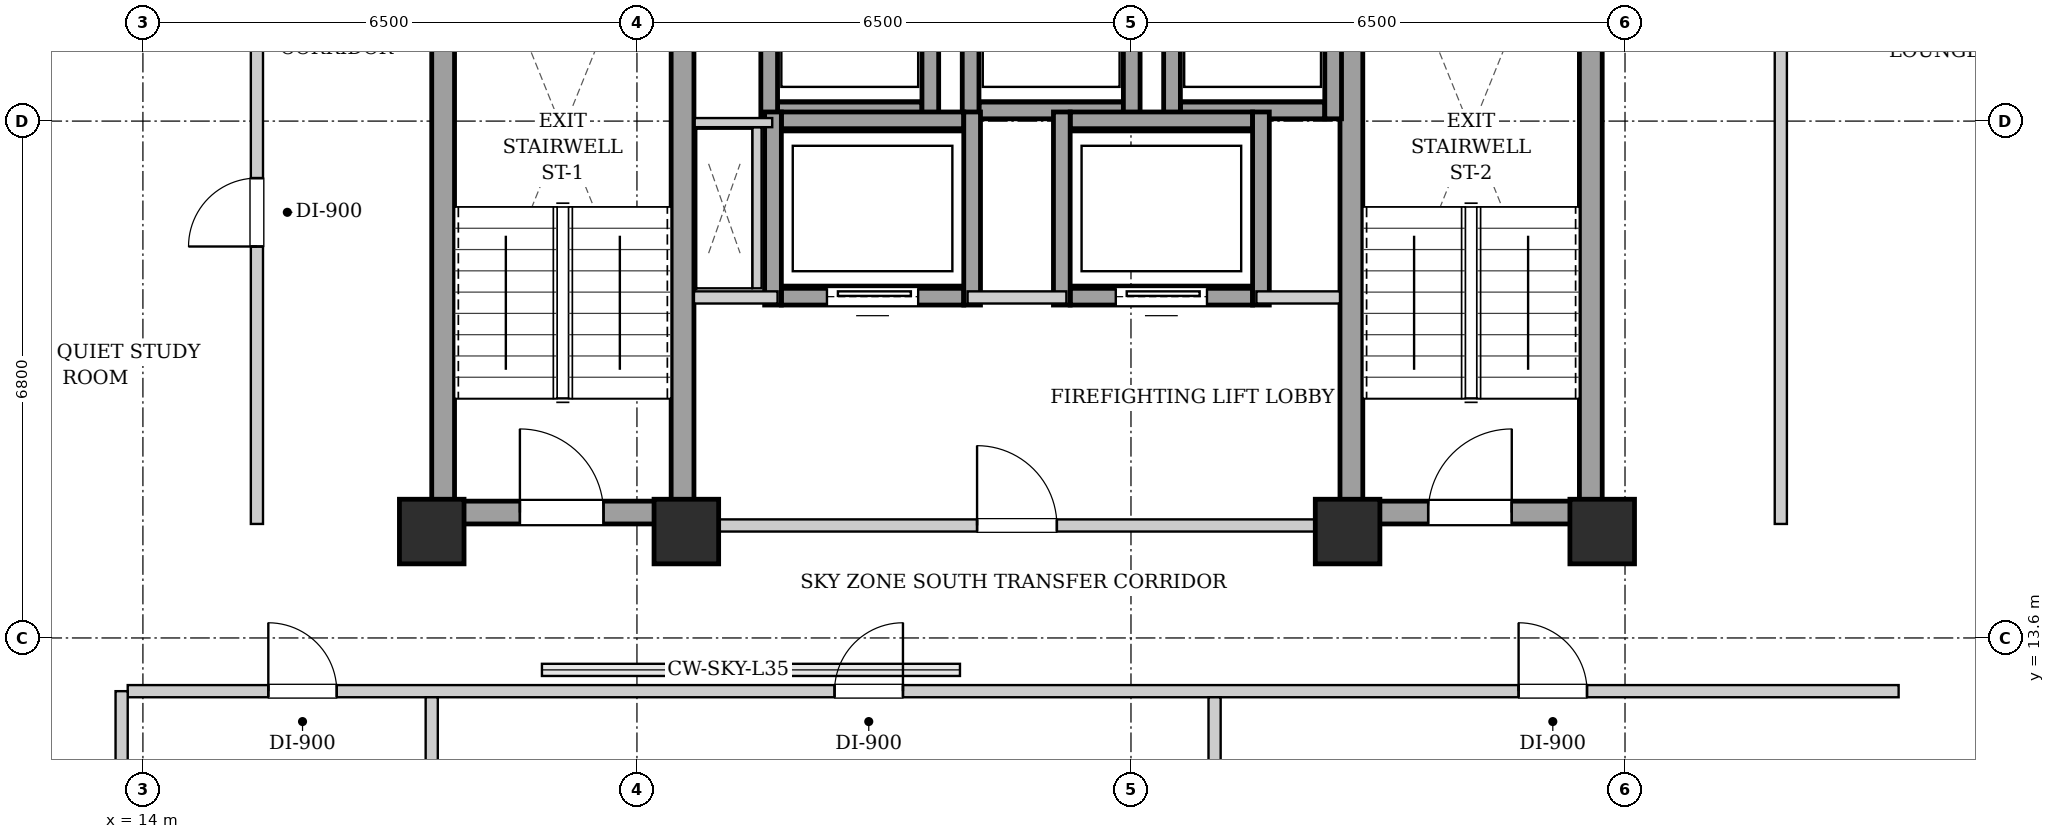
"""IFC4 building model, lengths in metres.
Left out: names, types, materials, properties, quantities, classifications, styles, units other than length and angle.
Written with IfcOpenShell. Run it as: python <this file> out.ifc"""

import sys

from ifc_helpers import new_model, si_unit, direction, frame, frame_2d, origin, origin_2d, place, context, subcontext, project, spatial, rectangle, extrude, element, fill, save


model = new_model("IFC4")
c1 = context("Model", 3, precision=1e-05, world=origin(), true_north=direction((0.0, 1.0)))
c2 = subcontext(c1, "Body", "Model", "MODEL_VIEW")
j1 = project(units=[si_unit("LENGTHUNIT", "METRE"), si_unit("PLANEANGLEUNIT", "RADIAN")], contexts=[c1])
p1 = place(None, origin())
s1 = spatial("IfcSite", under=j1, at=p1, CompositionType="ELEMENT")
p2 = place(p1, origin())
s2 = spatial("IfcBuilding", under=s1, at=p2, CompositionType="ELEMENT")
p3 = place(p2, frame((0.0, 0.0, 174.4)))
s3 = spatial("IfcBuildingStorey", under=s2, at=p3, CompositionType="ELEMENT", Elevation=174.4)
for number, where, z_axis, x_axis in (
    (1, (17.8, 15.0, 0.0), (0.0, 0.0, 1.0), (1.0, 0.0, 0.0)),
    (2, (21.15, 15.0, 0.0), (0.0, 0.0, 1.0), (1.0, 0.0, 0.0)),
    (3, (29.85, 15.0, 0.0), (0.0, 0.0, 1.0), (1.0, 0.0, 0.0)),
    (4, (33.2, 15.0, 0.0), (0.0, 0.0, 1.0), (1.0, 0.0, 0.0)),
):
    element("IfcColumn", number, at=place(p3, frame(where, z_axis=z_axis, x_axis=x_axis)), inside=s3, PredefinedType="COLUMN", context=c2, shape_type="SweptSolid", body=[
        extrude(rectangle(XDim=0.85, YDim=0.85, at=origin_2d()), origin(), (0.0, 0.0, 1.0), 3.3),
    ])
for number, where, z_axis, x_axis in (
    (5, (17.95, 15.1, 0.0), (0.0, 0.0, 1.0), (0.0, 1.0, 0.0)),
    (6, (21.1, 15.1, 0.0), (0.0, 0.0, 1.0), (0.0, 1.0, 0.0)),
):
    element("IfcWall", number, at=place(p3, frame(where, z_axis=z_axis, x_axis=x_axis)), inside=s3, PredefinedType="SHEAR", context=c2, shape_type="SweptSolid", body=[
        extrude(rectangle(XDim=9.0, YDim=0.3, at=frame_2d((4.5, 0.0))), origin(), (0.0, 0.0, 1.0), 3.04),
    ])
p4 = place(p3, frame((18.1, 15.25, 0.0), z_axis=(0.0, 0.0, 1.0), x_axis=(1.0, 0.0, 0.0)))
e7 = element("IfcWall", 7, at=p4, inside=s3, PredefinedType="SHEAR", context=c2, shape_type="SweptSolid", body=[
    extrude(rectangle(XDim=2.85, YDim=0.3, at=frame_2d((1.425, 0.0))), origin(), (0.0, 0.0, 1.0), 3.04),
])
p5 = place(p4, frame((0.86, 0.0, 0.0)))
e8 = element("IfcOpeningElement", 8, at=p5, cuts=e7, PredefinedType="OPENING", context=c2, shape_type="SweptSolid", body=[
    extrude(rectangle(XDim=1.1, YDim=2.05, at=frame_2d((0.55, 1.025))), frame((0.0, 0.16, 0.0), z_axis=(0.0, -1.0, 0.0), x_axis=(1.0, 0.0, 0.0)), (0.0, 0.0, 1.0), 0.32),
])
for number, where, z_axis, x_axis in (
    (9, (29.9, 15.1, 0.0), (0.0, 0.0, 1.0), (0.0, 1.0, 0.0)),
    (10, (33.05, 15.1, 0.0), (0.0, 0.0, 1.0), (0.0, 1.0, 0.0)),
):
    element("IfcWall", number, at=place(p3, frame(where, z_axis=z_axis, x_axis=x_axis)), inside=s3, PredefinedType="SHEAR", context=c2, shape_type="SweptSolid", body=[
        extrude(rectangle(XDim=9.0, YDim=0.3, at=frame_2d((4.5, 0.0))), origin(), (0.0, 0.0, 1.0), 3.04),
    ])
p6 = place(p3, frame((30.05, 15.25, 0.0), z_axis=(0.0, 0.0, 1.0), x_axis=(1.0, 0.0, 0.0)))
e11 = element("IfcWall", 11, at=p6, inside=s3, PredefinedType="SHEAR", context=c2, shape_type="SweptSolid", body=[
    extrude(rectangle(XDim=2.85, YDim=0.3, at=frame_2d((1.425, 0.0))), origin(), (0.0, 0.0, 1.0), 3.04),
])
p7 = place(p6, frame((0.86, 0.0, 0.0)))
e12 = element("IfcOpeningElement", 12, at=p7, cuts=e11, PredefinedType="OPENING", context=c2, shape_type="SweptSolid", body=[
    extrude(rectangle(XDim=1.1, YDim=2.05, at=frame_2d((0.55, 1.025))), frame((0.0, 0.16, 0.0), z_axis=(0.0, -1.0, 0.0), x_axis=(1.0, 0.0, 0.0)), (0.0, 0.0, 1.0), 0.32),
])
p8 = place(p3, frame((22.35, 20.54, 0.0), z_axis=(0.0, 0.0, 1.0), x_axis=(1.0, 0.0, 0.0)))
e13 = element("IfcWall", 13, at=p8, inside=s3, PredefinedType="SHEAR", context=c2, shape_type="SweptSolid", body=[
    extrude(rectangle(XDim=1.9, YDim=0.22, at=frame_2d((0.95, 0.0))), origin(), (0.0, 0.0, 1.0), 3.04),
])
for number, where, z_axis, x_axis in (
    (14, (22.24, 20.43, 0.0), (0.0, 0.0, 1.0), (0.0, 1.0, 0.0)),
    (15, (24.36, 20.43, 0.0), (0.0, 0.0, 1.0), (0.0, 1.0, 0.0)),
):
    element("IfcWall", number, at=place(p3, frame(where, z_axis=z_axis, x_axis=x_axis)), inside=s3, PredefinedType="SHEAR", context=c2, shape_type="SweptSolid", body=[
        extrude(rectangle(XDim=2.44, YDim=0.22, at=frame_2d((1.22, 0.0))), origin(), (0.0, 0.0, 1.0), 3.04),
    ])
p9 = place(p3, frame((25.0, 20.54, 0.0), z_axis=(0.0, 0.0, 1.0), x_axis=(1.0, 0.0, 0.0)))
e16 = element("IfcWall", 16, at=p9, inside=s3, PredefinedType="SHEAR", context=c2, shape_type="SweptSolid", body=[
    extrude(rectangle(XDim=1.9, YDim=0.22, at=frame_2d((0.95, 0.0))), origin(), (0.0, 0.0, 1.0), 3.04),
])
for number, where, z_axis, x_axis in (
    (17, (24.89, 20.43, 0.0), (0.0, 0.0, 1.0), (0.0, 1.0, 0.0)),
    (18, (27.01, 20.43, 0.0), (0.0, 0.0, 1.0), (0.0, 1.0, 0.0)),
):
    element("IfcWall", number, at=place(p3, frame(where, z_axis=z_axis, x_axis=x_axis)), inside=s3, PredefinedType="SHEAR", context=c2, shape_type="SweptSolid", body=[
        extrude(rectangle(XDim=2.44, YDim=0.22, at=frame_2d((1.22, 0.0))), origin(), (0.0, 0.0, 1.0), 3.04),
    ])
p10 = place(p3, frame((27.65, 20.54, 0.0), z_axis=(0.0, 0.0, 1.0), x_axis=(1.0, 0.0, 0.0)))
e19 = element("IfcWall", 19, at=p10, inside=s3, PredefinedType="SHEAR", context=c2, shape_type="SweptSolid", body=[
    extrude(rectangle(XDim=1.9, YDim=0.22, at=frame_2d((0.95, 0.0))), origin(), (0.0, 0.0, 1.0), 3.04),
])
for number, where, z_axis, x_axis in (
    (20, (27.54, 20.43, 0.0), (0.0, 0.0, 1.0), (0.0, 1.0, 0.0)),
    (21, (29.66, 20.43, 0.0), (0.0, 0.0, 1.0), (0.0, 1.0, 0.0)),
):
    element("IfcWall", number, at=place(p3, frame(where, z_axis=z_axis, x_axis=x_axis)), inside=s3, PredefinedType="SHEAR", context=c2, shape_type="SweptSolid", body=[
        extrude(rectangle(XDim=2.44, YDim=0.22, at=frame_2d((1.22, 0.0))), origin(), (0.0, 0.0, 1.0), 3.04),
    ])
p11 = place(p3, frame((22.4, 18.09, 0.0), z_axis=(0.0, 0.0, 1.0), x_axis=(1.0, 0.0, 0.0)))
e22 = element("IfcWall", 22, at=p11, inside=s3, PredefinedType="SHEAR", context=c2, shape_type="SweptSolid", body=[
    extrude(rectangle(XDim=2.4, YDim=0.22, at=frame_2d((1.2, 0.0))), origin(), (0.0, 0.0, 1.0), 3.04),
])
p12 = place(p11, frame((0.6, 0.0, 0.0)))
e23 = element("IfcOpeningElement", 23, at=p12, cuts=e22, PredefinedType="OPENING", context=c2, shape_type="SweptSolid", body=[
    extrude(rectangle(XDim=1.2, YDim=2.15, at=frame_2d((0.6, 1.075))), frame((0.0, 0.12, 0.0), z_axis=(0.0, -1.0, 0.0), x_axis=(1.0, 0.0, 0.0)), (0.0, 0.0, 1.0), 0.24),
])
p13 = place(p3, frame((22.4, 20.41, 0.0), z_axis=(0.0, 0.0, 1.0), x_axis=(1.0, 0.0, 0.0)))
e24 = element("IfcWall", 24, at=p13, inside=s3, PredefinedType="SHEAR", context=c2, shape_type="SweptSolid", body=[
    extrude(rectangle(XDim=2.4, YDim=0.22, at=frame_2d((1.2, 0.0))), origin(), (0.0, 0.0, 1.0), 3.04),
])
for number, where, z_axis, x_axis in (
    (25, (22.29, 17.98, 0.0), (0.0, 0.0, 1.0), (0.0, 1.0, 0.0)),
    (26, (24.91, 17.98, 0.0), (0.0, 0.0, 1.0), (0.0, 1.0, 0.0)),
):
    element("IfcWall", number, at=place(p3, frame(where, z_axis=z_axis, x_axis=x_axis)), inside=s3, PredefinedType="SHEAR", context=c2, shape_type="SweptSolid", body=[
        extrude(rectangle(XDim=2.54, YDim=0.22, at=frame_2d((1.27, 0.0))), origin(), (0.0, 0.0, 1.0), 3.04),
    ])
p14 = place(p3, frame((26.2, 18.09, 0.0), z_axis=(0.0, 0.0, 1.0), x_axis=(1.0, 0.0, 0.0)))
e27 = element("IfcWall", 27, at=p14, inside=s3, PredefinedType="SHEAR", context=c2, shape_type="SweptSolid", body=[
    extrude(rectangle(XDim=2.4, YDim=0.22, at=frame_2d((1.2, 0.0))), origin(), (0.0, 0.0, 1.0), 3.04),
])
p15 = place(p14, frame((0.6, 0.0, 0.0)))
e28 = element("IfcOpeningElement", 28, at=p15, cuts=e27, PredefinedType="OPENING", context=c2, shape_type="SweptSolid", body=[
    extrude(rectangle(XDim=1.2, YDim=2.15, at=frame_2d((0.6, 1.075))), frame((0.0, 0.12, 0.0), z_axis=(0.0, -1.0, 0.0), x_axis=(1.0, 0.0, 0.0)), (0.0, 0.0, 1.0), 0.24),
])
p16 = place(p3, frame((26.2, 20.41, 0.0), z_axis=(0.0, 0.0, 1.0), x_axis=(1.0, 0.0, 0.0)))
e29 = element("IfcWall", 29, at=p16, inside=s3, PredefinedType="SHEAR", context=c2, shape_type="SweptSolid", body=[
    extrude(rectangle(XDim=2.4, YDim=0.22, at=frame_2d((1.2, 0.0))), origin(), (0.0, 0.0, 1.0), 3.04),
])
for number, where, z_axis, x_axis in (
    (30, (26.09, 17.98, 0.0), (0.0, 0.0, 1.0), (0.0, 1.0, 0.0)),
    (31, (28.71, 17.98, 0.0), (0.0, 0.0, 1.0), (0.0, 1.0, 0.0)),
):
    element("IfcWall", number, at=place(p3, frame(where, z_axis=z_axis, x_axis=x_axis)), inside=s3, PredefinedType="SHEAR", context=c2, shape_type="SweptSolid", body=[
        extrude(rectangle(XDim=2.54, YDim=0.22, at=frame_2d((1.27, 0.0))), origin(), (0.0, 0.0, 1.0), 3.04),
    ])
p17 = place(p3, frame((21.25, 15.08, 0.0), z_axis=(0.0, 0.0, 1.0), x_axis=(1.0, 0.0, 0.0)))
e32 = element("IfcWall", 32, at=p17, inside=s3, PredefinedType="PARTITIONING", context=c2, shape_type="SweptSolid", body=[
    extrude(rectangle(XDim=8.5, YDim=0.16, at=frame_2d((4.25, 0.0))), origin(), (0.0, 0.0, 1.0), 2.556),
])
p18 = place(p17, frame((3.725, 0.0, 0.0)))
e33 = element("IfcOpeningElement", 33, at=p18, cuts=e32, PredefinedType="OPENING", context=c2, shape_type="SweptSolid", body=[
    extrude(rectangle(XDim=1.05, YDim=2.05, at=frame_2d((0.525, 1.025))), frame((0.0, 0.09, 0.0), z_axis=(0.0, -1.0, 0.0), x_axis=(1.0, 0.0, 0.0)), (0.0, 0.0, 1.0), 0.18),
])
p19 = place(p3, frame((21.25, 18.08, 0.0), z_axis=(0.0, 0.0, 1.0), x_axis=(1.0, 0.0, 0.0)))
e34 = element("IfcWall", 34, at=p19, inside=s3, PredefinedType="PARTITIONING", context=c2, shape_type="SweptSolid", body=[
    extrude(rectangle(XDim=1.1, YDim=0.16, at=frame_2d((0.55, 0.0))), origin(), (0.0, 0.0, 1.0), 3.04),
])
p20 = place(p3, frame((24.85, 18.08, 0.0), z_axis=(0.0, 0.0, 1.0), x_axis=(1.0, 0.0, 0.0)))
e35 = element("IfcWall", 35, at=p20, inside=s3, PredefinedType="PARTITIONING", context=c2, shape_type="SweptSolid", body=[
    extrude(rectangle(XDim=1.3, YDim=0.16, at=frame_2d((0.65, 0.0))), origin(), (0.0, 0.0, 1.0), 3.04),
])
p21 = place(p3, frame((28.65, 18.08, 0.0), z_axis=(0.0, 0.0, 1.0), x_axis=(1.0, 0.0, 0.0)))
e36 = element("IfcWall", 36, at=p21, inside=s3, PredefinedType="PARTITIONING", context=c2, shape_type="SweptSolid", body=[
    extrude(rectangle(XDim=1.1, YDim=0.16, at=frame_2d((0.55, 0.0))), origin(), (0.0, 0.0, 1.0), 3.04),
])
p22 = place(p3, frame((22.08, 18.2, 0.0), z_axis=(0.0, 0.0, 1.0), x_axis=(0.0, 1.0, 0.0)))
e37 = element("IfcWall", 37, at=p22, inside=s3, PredefinedType="PARTITIONING", context=c2, shape_type="SweptSolid", body=[
    extrude(rectangle(XDim=2.12, YDim=0.12, at=frame_2d((1.06, 0.0))), origin(), (0.0, 0.0, 1.0), 3.04),
])
p23 = place(p3, frame((22.28, 20.38, 0.0), z_axis=(0.0, 0.0, 1.0), x_axis=(-1.0, 0.0, 0.0)))
e38 = element("IfcWall", 38, at=p23, inside=s3, PredefinedType="PARTITIONING", context=c2, shape_type="SweptSolid", body=[
    extrude(rectangle(XDim=1.02, YDim=0.12, at=frame_2d((0.51, 0.0))), origin(), (0.0, 0.0, 1.0), 3.04),
])
p24 = place(p3, frame((13.8, 12.9, 0.0), z_axis=(0.0, 0.0, 1.0), x_axis=(1.0, 0.0, 0.0)))
e39 = element("IfcWall", 39, at=p24, inside=s3, PredefinedType="PARTITIONING", context=c2, shape_type="SweptSolid", body=[
    extrude(rectangle(XDim=23.3, YDim=0.16, at=frame_2d((11.65, 0.0))), origin(), (0.0, 0.0, 1.0), 3.04),
])
p25 = place(p24, frame((1.85, 0.0, 0.0)))
e40 = element("IfcOpeningElement", 40, at=p25, cuts=e39, PredefinedType="OPENING", context=c2, shape_type="SweptSolid", body=[
    extrude(rectangle(XDim=0.9, YDim=2.05, at=frame_2d((0.45, 1.025))), frame((0.0, 0.09, 0.0), z_axis=(0.0, -1.0, 0.0), x_axis=(1.0, 0.0, 0.0)), (0.0, 0.0, 1.0), 0.18),
])
p26 = place(p24, frame((9.3, 0.0, 0.0)))
e41 = element("IfcOpeningElement", 41, at=p26, cuts=e39, PredefinedType="OPENING", context=c2, shape_type="SweptSolid", body=[
    extrude(rectangle(XDim=0.9, YDim=2.05, at=frame_2d((0.45, 1.025))), frame((0.0, 0.09, 0.0), z_axis=(0.0, -1.0, 0.0), x_axis=(1.0, 0.0, 0.0)), (0.0, 0.0, 1.0), 0.18),
])
p27 = place(p24, frame((18.3, 0.0, 0.0)))
e42 = element("IfcOpeningElement", 42, at=p27, cuts=e39, PredefinedType="OPENING", context=c2, shape_type="SweptSolid", body=[
    extrude(rectangle(XDim=0.9, YDim=2.05, at=frame_2d((0.45, 1.025))), frame((0.0, 0.09, 0.0), z_axis=(0.0, -1.0, 0.0), x_axis=(1.0, 0.0, 0.0)), (0.0, 0.0, 1.0), 0.18),
])
p28 = place(p3, frame((17.8, 4.08, 0.0), z_axis=(0.0, 0.0, 1.0), x_axis=(0.0, 1.0, 0.0)))
e43 = element("IfcWall", 43, at=p28, inside=s3, PredefinedType="PARTITIONING", context=c2, shape_type="SweptSolid", body=[
    extrude(rectangle(XDim=8.74, YDim=0.16, at=frame_2d((4.37, 0.0))), origin(), (0.0, 0.0, 1.0), 2.556),
])
p29 = place(p3, frame((28.1, 4.08, 0.0), z_axis=(0.0, 0.0, 1.0), x_axis=(0.0, 1.0, 0.0)))
e44 = element("IfcWall", 44, at=p29, inside=s3, PredefinedType="PARTITIONING", context=c2, shape_type="SweptSolid", body=[
    extrude(rectangle(XDim=8.74, YDim=0.16, at=frame_2d((4.37, 0.0))), origin(), (0.0, 0.0, 1.0), 3.04),
])
p30 = place(p3, frame((13.72, 6.92, 0.0), z_axis=(0.0, 0.0, 1.0), x_axis=(0.0, 1.0, 0.0)))
e45 = element("IfcWall", 45, at=p30, inside=s3, PredefinedType="PARTITIONING", context=c2, shape_type="SweptSolid", body=[
    extrude(rectangle(XDim=5.98, YDim=0.16, at=frame_2d((2.99, 0.0))), origin(), (0.0, 0.0, 1.0), 3.04),
])
p31 = place(p3, frame((15.5, 15.1, 0.0), z_axis=(0.0, 0.0, 1.0), x_axis=(0.0, 1.0, 0.0)))
e46 = element("IfcWall", 46, at=p31, inside=s3, PredefinedType="PARTITIONING", context=c2, shape_type="SweptSolid", body=[
    extrude(rectangle(XDim=13.8, YDim=0.16, at=frame_2d((6.9, 0.0))), origin(), (0.0, 0.0, 1.0), 3.04),
])
p32 = place(p31, frame((3.65, 0.0, 0.0)))
e47 = element("IfcOpeningElement", 47, at=p32, cuts=e46, PredefinedType="OPENING", context=c2, shape_type="SweptSolid", body=[
    extrude(rectangle(XDim=0.9, YDim=2.05, at=frame_2d((0.45, 1.025))), frame((0.0, 0.09, 0.0), z_axis=(0.0, -1.0, 0.0), x_axis=(1.0, 0.0, 0.0)), (0.0, 0.0, 1.0), 0.18),
])
p33 = place(p31, frame((10.05, 0.0, 0.0)))
e48 = element("IfcOpeningElement", 48, at=p33, cuts=e46, PredefinedType="OPENING", context=c2, shape_type="SweptSolid", body=[
    extrude(rectangle(XDim=0.9, YDim=2.05, at=frame_2d((0.45, 1.025))), frame((0.0, 0.09, 0.0), z_axis=(0.0, -1.0, 0.0), x_axis=(1.0, 0.0, 0.0)), (0.0, 0.0, 1.0), 0.18),
])
p34 = place(p3, frame((35.55, 15.1, 0.0), z_axis=(0.0, 0.0, 1.0), x_axis=(0.0, 1.0, 0.0)))
e49 = element("IfcWall", 49, at=p34, inside=s3, PredefinedType="PARTITIONING", context=c2, shape_type="SweptSolid", body=[
    extrude(rectangle(XDim=13.8, YDim=0.16, at=frame_2d((6.9, 0.0))), origin(), (0.0, 0.0, 1.0), 3.04),
])
p35 = place(p34, frame((6.475, 0.0, 0.0)))
e50 = element("IfcOpeningElement", 50, at=p35, cuts=e49, PredefinedType="OPENING", context=c2, shape_type="SweptSolid", body=[
    extrude(rectangle(XDim=1.05, YDim=2.05, at=frame_2d((0.525, 1.025))), frame((0.0, 0.09, 0.0), z_axis=(0.0, -1.0, 0.0), x_axis=(1.0, 0.0, 0.0)), (0.0, 0.0, 1.0), 0.18),
])
p36 = place(p5, origin())
e51 = element("IfcDoor", 51, at=p36, inside=s3, OperationType="SINGLE_SWING_LEFT", PredefinedType="DOOR", context=c2, shape_type="SweptSolid", body=[
    extrude(rectangle(XDim=1.1, YDim=2.05, at=frame_2d((0.55, 1.025))), frame((0.0, 0.025, 0.0), z_axis=(0.0, -1.0, 0.0), x_axis=(1.0, 0.0, 0.0)), (0.0, 0.0, 1.0), 0.05),
])
fill(e8, e51)
p37 = place(p7, origin())
e52 = element("IfcDoor", 52, at=p37, inside=s3, OperationType="SINGLE_SWING_RIGHT", PredefinedType="DOOR", context=c2, shape_type="SweptSolid", body=[
    extrude(rectangle(XDim=1.1, YDim=2.05, at=frame_2d((0.55, 1.025))), frame((0.0, 0.025, 0.0), z_axis=(0.0, -1.0, 0.0), x_axis=(1.0, 0.0, 0.0)), (0.0, 0.0, 1.0), 0.05),
])
fill(e12, e52)
p38 = place(p12, origin())
e53 = element("IfcDoor", 53, at=p38, inside=s3, OperationType="SLIDING_TO_LEFT", PredefinedType="DOOR", context=c2, shape_type="SweptSolid", body=[
    extrude(rectangle(XDim=1.2, YDim=2.15, at=frame_2d((0.6, 1.075))), frame((0.0, 0.025, 0.0), z_axis=(0.0, -1.0, 0.0), x_axis=(1.0, 0.0, 0.0)), (0.0, 0.0, 1.0), 0.05),
])
fill(e23, e53)
p39 = place(p15, origin())
e54 = element("IfcDoor", 54, at=p39, inside=s3, OperationType="SLIDING_TO_LEFT", PredefinedType="DOOR", context=c2, shape_type="SweptSolid", body=[
    extrude(rectangle(XDim=1.2, YDim=2.15, at=frame_2d((0.6, 1.075))), frame((0.0, 0.025, 0.0), z_axis=(0.0, -1.0, 0.0), x_axis=(1.0, 0.0, 0.0)), (0.0, 0.0, 1.0), 0.05),
])
fill(e28, e54)
p40 = place(p18, origin())
e55 = element("IfcDoor", 55, at=p40, inside=s3, OperationType="SINGLE_SWING_LEFT", PredefinedType="DOOR", context=c2, shape_type="SweptSolid", body=[
    extrude(rectangle(XDim=1.05, YDim=2.05, at=frame_2d((0.525, 1.025))), frame((0.0, 0.025, 0.0), z_axis=(0.0, -1.0, 0.0), x_axis=(1.0, 0.0, 0.0)), (0.0, 0.0, 1.0), 0.05),
])
fill(e33, e55)
p41 = place(p25, origin())
e56 = element("IfcDoor", 56, at=p41, inside=s3, OperationType="SINGLE_SWING_LEFT", PredefinedType="DOOR", context=c2, shape_type="SweptSolid", body=[
    extrude(rectangle(XDim=0.9, YDim=2.05, at=frame_2d((0.45, 1.025))), frame((0.0, 0.025, 0.0), z_axis=(0.0, -1.0, 0.0), x_axis=(1.0, 0.0, 0.0)), (0.0, 0.0, 1.0), 0.05),
])
fill(e40, e56)
p42 = place(p26, origin())
e57 = element("IfcDoor", 57, at=p42, inside=s3, OperationType="SINGLE_SWING_RIGHT", PredefinedType="DOOR", context=c2, shape_type="SweptSolid", body=[
    extrude(rectangle(XDim=0.9, YDim=2.05, at=frame_2d((0.45, 1.025))), frame((0.0, 0.025, 0.0), z_axis=(0.0, -1.0, 0.0), x_axis=(1.0, 0.0, 0.0)), (0.0, 0.0, 1.0), 0.05),
])
fill(e41, e57)
p43 = place(p27, origin())
e58 = element("IfcDoor", 58, at=p43, inside=s3, OperationType="SINGLE_SWING_LEFT", PredefinedType="DOOR", context=c2, shape_type="SweptSolid", body=[
    extrude(rectangle(XDim=0.9, YDim=2.05, at=frame_2d((0.45, 1.025))), frame((0.0, 0.025, 0.0), z_axis=(0.0, -1.0, 0.0), x_axis=(1.0, 0.0, 0.0)), (0.0, 0.0, 1.0), 0.05),
])
fill(e42, e58)
p44 = place(p32, origin())
e59 = element("IfcDoor", 59, at=p44, inside=s3, OperationType="SINGLE_SWING_LEFT", PredefinedType="DOOR", context=c2, shape_type="SweptSolid", body=[
    extrude(rectangle(XDim=0.9, YDim=2.05, at=frame_2d((0.45, 1.025))), frame((0.0, 0.025, 0.0), z_axis=(0.0, -1.0, 0.0), x_axis=(1.0, 0.0, 0.0)), (0.0, 0.0, 1.0), 0.05),
])
fill(e47, e59)
save(model, sys.argv[1])
